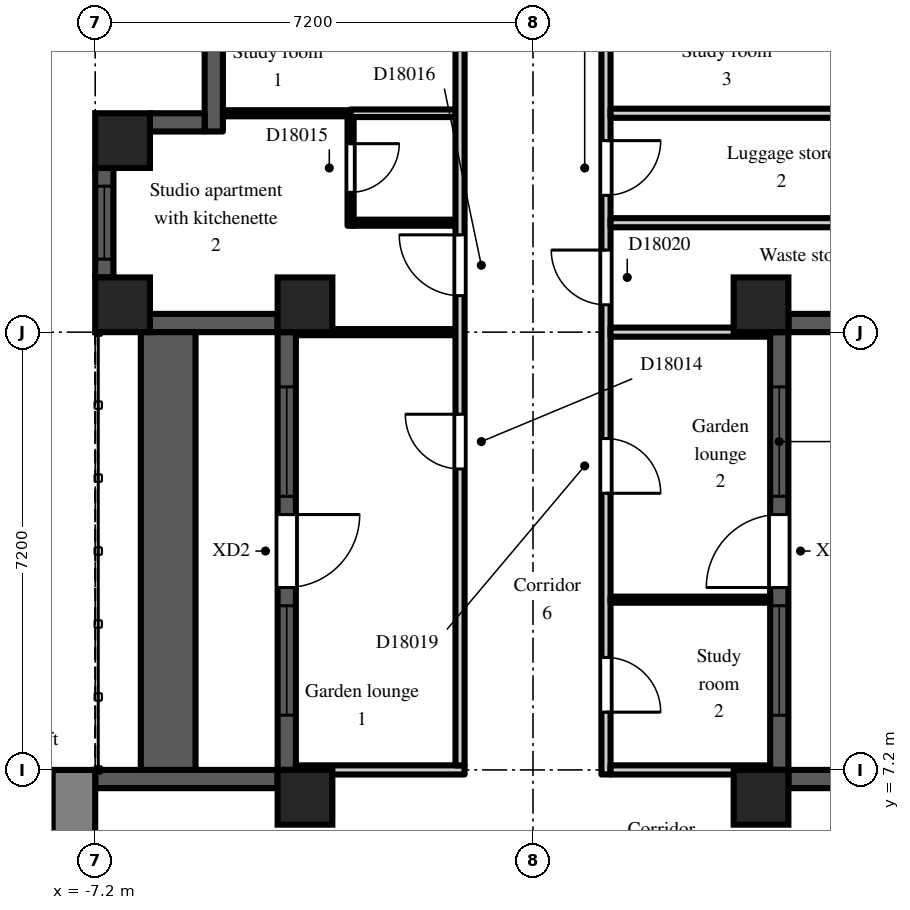
"""IFC4 building model, lengths in metres.
Left out: names, types, materials, properties, quantities, classifications, styles, units other than length and angle.
Written with IfcOpenShell. Run it as: python <this file> out.ifc"""

import sys

from ifc_helpers import new_model, si_unit, direction, frame, frame_2d, origin, origin_2d, place, context, subcontext, project, spatial, rectangle, extrude, element, fill, save


model = new_model("IFC4")
c1 = context("Model", 3, precision=1e-05, world=origin(), true_north=direction((0.0, 1.0)))
c2 = subcontext(c1, "Body", "Model", "MODEL_VIEW")
j1 = project(units=[si_unit("LENGTHUNIT", "METRE"), si_unit("PLANEANGLEUNIT", "RADIAN")], contexts=[c1])
p1 = place(None, origin())
s1 = spatial("IfcSite", under=j1, at=p1, CompositionType="ELEMENT")
p2 = place(p1, origin())
s2 = spatial("IfcBuilding", under=s1, at=p2, CompositionType="ELEMENT")
p3 = place(p2, frame((0.0, 0.0, 123.3)))
s3 = spatial("IfcBuildingStorey", under=s2, at=p3, CompositionType="ELEMENT", Elevation=123.3)
for number, where, z_axis, x_axis in (
    (1, (-6.75, 14.85, 0.0), (0.0, 0.0, 1.0), (1.0, 0.0, 0.0)),
    (2, (-6.75, 17.55, 0.0), (0.0, 0.0, 1.0), (1.0, 0.0, 0.0)),
    (3, (-3.75, 6.75, 0.0), (0.0, 0.0, 1.0), (1.0, 0.0, 0.0)),
    (4, (-3.75, 14.85, 0.0), (0.0, 0.0, 1.0), (1.0, 0.0, 0.0)),
    (5, (3.75, 6.75, 0.0), (0.0, 0.0, 1.0), (1.0, 0.0, 0.0)),
    (6, (3.75, 14.85, 0.0), (0.0, 0.0, 1.0), (1.0, 0.0, 0.0)),
):
    element("IfcColumn", number, at=place(p3, frame(where, z_axis=z_axis, x_axis=x_axis)), inside=s3, PredefinedType="COLUMN", context=c2, shape_type="SweptSolid", body=[
        extrude(rectangle(XDim=0.9, YDim=0.9, at=origin_2d()), origin(), (0.0, 0.0, 1.0), 3.0),
    ])
p4 = place(p3, frame((7.2, 7.05, 0.0), z_axis=(0.0, 0.0, 1.0), x_axis=(-1.0, 0.0, 0.0)))
e7 = element("IfcWall", 7, at=p4, inside=s3, PredefinedType="SOLIDWALL", context=c2, shape_type="SweptSolid", body=[
    extrude(rectangle(XDim=3.0, YDim=0.3, at=frame_2d((1.5, 0.0))), origin(), (0.0, 0.0, 1.0), 2.2),
])
p5 = place(p3, frame((4.05, 7.2, 0.0), z_axis=(0.0, 0.0, 1.0), x_axis=(0.0, 1.0, 0.0)))
e8 = element("IfcWall", 8, at=p5, inside=s3, PredefinedType="SOLIDWALL", context=c2, shape_type="SweptSolid", body=[
    extrude(rectangle(XDim=7.2, YDim=0.3, at=frame_2d((3.6, 0.0))), origin(), (0.0, 0.0, 1.0), 2.2),
])
p6 = place(p5, frame((3.0, 0.0, 0.0)))
e9 = element("IfcOpeningElement", 9, at=p6, cuts=e8, PredefinedType="OPENING", context=c2, shape_type="SweptSolid", body=[
    extrude(rectangle(XDim=1.2, YDim=2.05, at=frame_2d((0.6, 1.025))), frame((0.0, 0.16, 0.0), z_axis=(0.0, -1.0, 0.0), x_axis=(1.0, 0.0, 0.0)), (0.0, 0.0, 1.0), 0.32),
])
p7 = place(p5, frame((0.9, 0.0, 0.2)))
e10 = element("IfcOpeningElement", 10, at=p7, cuts=e8, PredefinedType="OPENING", context=c2, shape_type="SweptSolid", body=[
    extrude(rectangle(XDim=1.8, YDim=1.85, at=frame_2d((0.9, 0.925))), frame((0.0, 0.16, 0.0), z_axis=(0.0, -1.0, 0.0), x_axis=(1.0, 0.0, 0.0)), (0.0, 0.0, 1.0), 0.32),
])
p8 = place(p5, frame((4.5, 0.0, 0.2)))
e11 = element("IfcOpeningElement", 11, at=p8, cuts=e8, PredefinedType="OPENING", context=c2, shape_type="SweptSolid", body=[
    extrude(rectangle(XDim=1.8, YDim=1.85, at=frame_2d((0.9, 0.925))), frame((0.0, 0.16, 0.0), z_axis=(0.0, -1.0, 0.0), x_axis=(1.0, 0.0, 0.0)), (0.0, 0.0, 1.0), 0.32),
])
p9 = place(p3, frame((4.2, 14.55, 0.0), z_axis=(0.0, 0.0, 1.0), x_axis=(1.0, 0.0, 0.0)))
e12 = element("IfcWall", 12, at=p9, inside=s3, PredefinedType="SOLIDWALL", context=c2, shape_type="SweptSolid", body=[
    extrude(rectangle(XDim=2.1, YDim=0.3, at=frame_2d((1.05, 0.0))), origin(), (0.0, 0.0, 1.0), 2.2),
])
p10 = place(p3, frame((-5.25, 19.5, 0.0), z_axis=(0.0, 0.0, 1.0), x_axis=(0.0, -1.0, 0.0)))
e13 = element("IfcWall", 13, at=p10, inside=s3, PredefinedType="SOLIDWALL", context=c2, shape_type="SweptSolid", body=[
    extrude(rectangle(XDim=1.8, YDim=0.3, at=frame_2d((0.9, 0.0))), origin(), (0.0, 0.0, 1.0), 2.6),
])
p11 = place(p3, frame((-5.4, 17.85, 0.0), z_axis=(0.0, 0.0, 1.0), x_axis=(-1.0, 0.0, 0.0)))
e14 = element("IfcWall", 14, at=p11, inside=s3, PredefinedType="SOLIDWALL", context=c2, shape_type="SweptSolid", body=[
    extrude(rectangle(XDim=0.9, YDim=0.3, at=frame_2d((0.45, 0.0))), origin(), (0.0, 0.0, 1.0), 2.6),
])
p12 = place(p3, frame((-7.05, 17.1, 0.0), z_axis=(0.0, 0.0, 1.0), x_axis=(0.0, -1.0, 0.0)))
e15 = element("IfcWall", 15, at=p12, inside=s3, PredefinedType="SOLIDWALL", context=c2, shape_type="SweptSolid", body=[
    extrude(rectangle(XDim=1.8, YDim=0.3, at=frame_2d((0.9, 0.0))), origin(), (0.0, 0.0, 1.0), 2.2),
])
p13 = place(p12, frame((0.3, 0.0, 0.2)))
e16 = element("IfcOpeningElement", 16, at=p13, cuts=e15, PredefinedType="OPENING", context=c2, shape_type="SweptSolid", body=[
    extrude(rectangle(XDim=1.2, YDim=1.85, at=frame_2d((0.6, 0.925))), frame((0.0, 0.16, 0.0), z_axis=(0.0, -1.0, 0.0), x_axis=(1.0, 0.0, 0.0)), (0.0, 0.0, 1.0), 0.32),
])
p14 = place(p3, frame((-6.3, 14.55, 0.0), z_axis=(0.0, 0.0, 1.0), x_axis=(1.0, 0.0, 0.0)))
e17 = element("IfcWall", 17, at=p14, inside=s3, PredefinedType="SOLIDWALL", context=c2, shape_type="SweptSolid", body=[
    extrude(rectangle(XDim=2.1, YDim=0.3, at=frame_2d((1.05, 0.0))), origin(), (0.0, 0.0, 1.0), 2.2),
])
p15 = place(p3, frame((-4.05, 14.4, 0.0), z_axis=(0.0, 0.0, 1.0), x_axis=(0.0, -1.0, 0.0)))
e18 = element("IfcWall", 18, at=p15, inside=s3, PredefinedType="SOLIDWALL", context=c2, shape_type="SweptSolid", body=[
    extrude(rectangle(XDim=7.2, YDim=0.3, at=frame_2d((3.6, 0.0))), origin(), (0.0, 0.0, 1.0), 2.2),
])
p16 = place(p15, frame((3.0, 0.0, 0.0)))
e19 = element("IfcOpeningElement", 19, at=p16, cuts=e18, PredefinedType="OPENING", context=c2, shape_type="SweptSolid", body=[
    extrude(rectangle(XDim=1.2, YDim=2.05, at=frame_2d((0.6, 1.025))), frame((0.0, 0.16, 0.0), z_axis=(0.0, -1.0, 0.0), x_axis=(1.0, 0.0, 0.0)), (0.0, 0.0, 1.0), 0.32),
])
p17 = place(p15, frame((0.9, 0.0, 0.2)))
e20 = element("IfcOpeningElement", 20, at=p17, cuts=e18, PredefinedType="OPENING", context=c2, shape_type="SweptSolid", body=[
    extrude(rectangle(XDim=1.8, YDim=1.85, at=frame_2d((0.9, 0.925))), frame((0.0, 0.16, 0.0), z_axis=(0.0, -1.0, 0.0), x_axis=(1.0, 0.0, 0.0)), (0.0, 0.0, 1.0), 0.32),
])
p18 = place(p15, frame((4.5, 0.0, 0.2)))
e21 = element("IfcOpeningElement", 21, at=p18, cuts=e18, PredefinedType="OPENING", context=c2, shape_type="SweptSolid", body=[
    extrude(rectangle(XDim=1.8, YDim=1.85, at=frame_2d((0.9, 0.925))), frame((0.0, 0.16, 0.0), z_axis=(0.0, -1.0, 0.0), x_axis=(1.0, 0.0, 0.0)), (0.0, 0.0, 1.0), 0.32),
])
p19 = place(p3, frame((-4.2, 7.05, 0.0), z_axis=(0.0, 0.0, 1.0), x_axis=(-1.0, 0.0, 0.0)))
e22 = element("IfcWall", 22, at=p19, inside=s3, PredefinedType="SOLIDWALL", context=c2, shape_type="SweptSolid", body=[
    extrude(rectangle(XDim=3.0, YDim=0.3, at=frame_2d((1.5, 0.0))), origin(), (0.0, 0.0, 1.0), 2.2),
])
p20 = place(p3, frame((-6.0, 7.2, 0.0), z_axis=(0.0, 0.0, 1.0), x_axis=(0.0, 1.0, 0.0)))
e23 = element("IfcWall", 23, at=p20, inside=s3, PredefinedType="PARAPET", context=c2, shape_type="SweptSolid", body=[
    extrude(rectangle(XDim=7.2, YDim=0.9, at=frame_2d((3.6, 0.0))), origin(), (0.0, 0.0, 1.0), 0.8),
])
p21 = place(p3, frame((-7.55, -7.2, 0.0), z_axis=(0.0, 0.0, 1.0), x_axis=(0.0, 1.0, 0.0)))
e24 = element("IfcWall", 24, at=p21, inside=s3, PredefinedType="SHEAR", context=c2, shape_type="SweptSolid", body=[
    extrude(rectangle(XDim=14.4, YDim=0.7, at=frame_2d((7.2, 0.0))), origin(), (0.0, 0.0, 1.0), 2.6),
])
p22 = place(p21, frame((6.0, 0.0, 0.0)))
e25 = element("IfcOpeningElement", 25, at=p22, cuts=e24, PredefinedType="OPENING", context=c2, shape_type="SweptSolid", body=[
    extrude(rectangle(XDim=2.4, YDim=2.2, at=frame_2d((1.2, 1.1))), frame((0.0, 0.36, 0.0), z_axis=(0.0, -1.0, 0.0), x_axis=(1.0, 0.0, 0.0)), (0.0, 0.0, 1.0), 0.72),
])
p23 = place(p3, frame((-5.1, 18.0, 0.0), z_axis=(0.0, 0.0, 1.0), x_axis=(1.0, 0.0, 0.0)))
e26 = element("IfcWall", 26, at=p23, inside=s3, PredefinedType="PARTITIONING", context=c2, shape_type="SweptSolid", body=[
    extrude(rectangle(XDim=2.1, YDim=0.1, at=frame_2d((1.05, 0.0))), origin(), (0.0, 0.0, 1.0), 2.6),
])
p24 = place(p3, frame((-3.9, 7.2, 0.0), z_axis=(0.0, 0.0, 1.0), x_axis=(1.0, 0.0, 0.0)))
e27 = element("IfcWall", 27, at=p24, inside=s3, PredefinedType="PARTITIONING", context=c2, shape_type="SweptSolid", body=[
    extrude(rectangle(XDim=2.775, YDim=0.15, at=frame_2d((1.387, 0.0))), origin(), (0.0, 0.0, 1.0), 2.6),
])
p25 = place(p3, frame((-3.9, 14.4, 0.0), z_axis=(0.0, 0.0, 1.0), x_axis=(1.0, 0.0, 0.0)))
e28 = element("IfcWall", 28, at=p25, inside=s3, PredefinedType="PARTITIONING", context=c2, shape_type="SweptSolid", body=[
    extrude(rectangle(XDim=2.625, YDim=0.1, at=frame_2d((1.312, 0.0))), origin(), (0.0, 0.0, 1.0), 2.6),
])
p26 = place(p3, frame((-3.0, 16.15, 0.0), z_axis=(0.0, 0.0, 1.0), x_axis=(0.0, 1.0, 0.0)))
e29 = element("IfcWall", 29, at=p26, inside=s3, PredefinedType="PARTITIONING", context=c2, shape_type="SweptSolid", body=[
    extrude(rectangle(XDim=1.788, YDim=0.1, at=frame_2d((0.894, 0.0))), origin(), (0.0, 0.0, 1.0), 2.6),
])
p27 = place(p26, frame((0.55, 0.0, 0.0)))
e30 = element("IfcOpeningElement", 30, at=p27, cuts=e29, PredefinedType="OPENING", context=c2, shape_type="SweptSolid", body=[
    extrude(rectangle(XDim=0.8, YDim=2.1, at=frame_2d((0.4, 1.05))), frame((0.0, 0.06, 0.0), z_axis=(0.0, -1.0, 0.0), x_axis=(1.0, 0.0, 0.0)), (0.0, 0.0, 1.0), 0.12),
])
p28 = place(p3, frame((-2.95, 16.2, 0.0), z_axis=(0.0, 0.0, 1.0), x_axis=(1.0, 0.0, 0.0)))
e31 = element("IfcWall", 31, at=p28, inside=s3, PredefinedType="PARTITIONING", context=c2, shape_type="SweptSolid", body=[
    extrude(rectangle(XDim=1.675, YDim=0.1, at=frame_2d((0.837, 0.0))), origin(), (0.0, 0.0, 1.0), 2.6),
])
p29 = place(p3, frame((-3.0, 18.0, 0.0), z_axis=(0.0, 0.0, 1.0), x_axis=(1.0, 0.0, 0.0)))
e32 = element("IfcWall", 32, at=p29, inside=s3, PredefinedType="PARTITIONING", context=c2, shape_type="SweptSolid", body=[
    extrude(rectangle(XDim=1.725, YDim=0.125, at=frame_2d((0.863, 0.0))), origin(), (0.0, 0.0, 1.0), 2.6),
])
p30 = place(p3, frame((-1.2, 7.275, 0.0), z_axis=(0.0, 0.0, 1.0), x_axis=(0.0, 1.0, 0.0)))
e33 = element("IfcWall", 33, at=p30, inside=s3, PredefinedType="PARTITIONING", context=c2, shape_type="SweptSolid", body=[
    extrude(rectangle(XDim=14.025, YDim=0.15, at=frame_2d((7.013, 0.0))), origin(), (0.0, 0.0, 1.0), 2.6),
])
p31 = place(p30, frame((4.875, 0.0, 0.0)))
e34 = element("IfcOpeningElement", 34, at=p31, cuts=e33, PredefinedType="OPENING", context=c2, shape_type="SweptSolid", body=[
    extrude(rectangle(XDim=0.9, YDim=2.1, at=frame_2d((0.45, 1.05))), frame((0.0, 0.085, 0.0), z_axis=(0.0, -1.0, 0.0), x_axis=(1.0, 0.0, 0.0)), (0.0, 0.0, 1.0), 0.17),
])
p32 = place(p30, frame((7.725, 0.0, 0.0)))
e35 = element("IfcOpeningElement", 35, at=p32, cuts=e33, PredefinedType="OPENING", context=c2, shape_type="SweptSolid", body=[
    extrude(rectangle(XDim=1.0, YDim=2.1, at=frame_2d((0.5, 1.05))), frame((0.0, 0.085, 0.0), z_axis=(0.0, -1.0, 0.0), x_axis=(1.0, 0.0, 0.0)), (0.0, 0.0, 1.0), 0.17),
])
p33 = place(p30, frame((11.925, 0.0, 0.0)))
e36 = element("IfcOpeningElement", 36, at=p33, cuts=e33, PredefinedType="OPENING", context=c2, shape_type="SweptSolid", body=[
    extrude(rectangle(XDim=0.9, YDim=2.1, at=frame_2d((0.45, 1.05))), frame((0.0, 0.085, 0.0), z_axis=(0.0, -1.0, 0.0), x_axis=(1.0, 0.0, 0.0)), (0.0, 0.0, 1.0), 0.17),
])
p34 = place(p3, frame((1.2, 7.125, 0.0), z_axis=(0.0, 0.0, 1.0), x_axis=(0.0, 1.0, 0.0)))
e37 = element("IfcWall", 37, at=p34, inside=s3, PredefinedType="PARTITIONING", context=c2, shape_type="SweptSolid", body=[
    extrude(rectangle(XDim=14.175, YDim=0.15, at=frame_2d((7.087, 0.0))), origin(), (0.0, 0.0, 1.0), 2.6),
])
p35 = place(p34, frame((1.025, 0.0, 0.0)))
e38 = element("IfcOpeningElement", 38, at=p35, cuts=e37, PredefinedType="OPENING", context=c2, shape_type="SweptSolid", body=[
    extrude(rectangle(XDim=0.9, YDim=2.1, at=frame_2d((0.45, 1.05))), frame((0.0, 0.085, 0.0), z_axis=(0.0, -1.0, 0.0), x_axis=(1.0, 0.0, 0.0)), (0.0, 0.0, 1.0), 0.17),
])
p36 = place(p34, frame((4.625, 0.0, 0.0)))
e39 = element("IfcOpeningElement", 39, at=p36, cuts=e37, PredefinedType="OPENING", context=c2, shape_type="SweptSolid", body=[
    extrude(rectangle(XDim=0.9, YDim=2.1, at=frame_2d((0.45, 1.05))), frame((0.0, 0.085, 0.0), z_axis=(0.0, -1.0, 0.0), x_axis=(1.0, 0.0, 0.0)), (0.0, 0.0, 1.0), 0.17),
])
p37 = place(p34, frame((7.725, 0.0, 0.0)))
e40 = element("IfcOpeningElement", 40, at=p37, cuts=e37, PredefinedType="OPENING", context=c2, shape_type="SweptSolid", body=[
    extrude(rectangle(XDim=0.9, YDim=2.1, at=frame_2d((0.45, 1.05))), frame((0.0, 0.085, 0.0), z_axis=(0.0, -1.0, 0.0), x_axis=(1.0, 0.0, 0.0)), (0.0, 0.0, 1.0), 0.17),
])
p38 = place(p34, frame((9.525, 0.0, 0.0)))
e41 = element("IfcOpeningElement", 41, at=p38, cuts=e37, PredefinedType="OPENING", context=c2, shape_type="SweptSolid", body=[
    extrude(rectangle(XDim=0.9, YDim=2.1, at=frame_2d((0.45, 1.05))), frame((0.0, 0.085, 0.0), z_axis=(0.0, -1.0, 0.0), x_axis=(1.0, 0.0, 0.0)), (0.0, 0.0, 1.0), 0.17),
])
p39 = place(p34, frame((12.075, 0.0, 0.0)))
e42 = element("IfcOpeningElement", 42, at=p39, cuts=e37, PredefinedType="OPENING", context=c2, shape_type="SweptSolid", body=[
    extrude(rectangle(XDim=0.9, YDim=2.1, at=frame_2d((0.45, 1.05))), frame((0.0, 0.085, 0.0), z_axis=(0.0, -1.0, 0.0), x_axis=(1.0, 0.0, 0.0)), (0.0, 0.0, 1.0), 0.17),
])
p40 = place(p3, frame((1.275, 7.2, 0.0), z_axis=(0.0, 0.0, 1.0), x_axis=(1.0, 0.0, 0.0)))
e43 = element("IfcWall", 43, at=p40, inside=s3, PredefinedType="PARTITIONING", context=c2, shape_type="SweptSolid", body=[
    extrude(rectangle(XDim=2.625, YDim=0.15, at=frame_2d((1.312, 0.0))), origin(), (0.0, 0.0, 1.0), 2.6),
])
p41 = place(p3, frame((1.275, 10.0, 0.0), z_axis=(0.0, 0.0, 1.0), x_axis=(1.0, 0.0, 0.0)))
e44 = element("IfcWall", 44, at=p41, inside=s3, PredefinedType="PARTITIONING", context=c2, shape_type="SweptSolid", body=[
    extrude(rectangle(XDim=2.625, YDim=0.1, at=frame_2d((1.312, 0.0))), origin(), (0.0, 0.0, 1.0), 2.6),
])
p42 = place(p3, frame((1.275, 14.4, 0.0), z_axis=(0.0, 0.0, 1.0), x_axis=(1.0, 0.0, 0.0)))
e45 = element("IfcWall", 45, at=p42, inside=s3, PredefinedType="PARTITIONING", context=c2, shape_type="SweptSolid", body=[
    extrude(rectangle(XDim=2.625, YDim=0.15, at=frame_2d((1.312, 0.0))), origin(), (0.0, 0.0, 1.0), 2.6),
])
p43 = place(p3, frame((1.275, 16.2, 0.0), z_axis=(0.0, 0.0, 1.0), x_axis=(1.0, 0.0, 0.0)))
e46 = element("IfcWall", 46, at=p43, inside=s3, PredefinedType="PARTITIONING", context=c2, shape_type="SweptSolid", body=[
    extrude(rectangle(XDim=5.625, YDim=0.15, at=frame_2d((2.812, 0.0))), origin(), (0.0, 0.0, 1.0), 2.6),
])
p44 = place(p3, frame((1.275, 18.0, 0.0), z_axis=(0.0, 0.0, 1.0), x_axis=(1.0, 0.0, 0.0)))
e47 = element("IfcWall", 47, at=p44, inside=s3, PredefinedType="PARTITIONING", context=c2, shape_type="SweptSolid", body=[
    extrude(rectangle(XDim=3.825, YDim=0.15, at=frame_2d((1.913, 0.0))), origin(), (0.0, 0.0, 1.0), 2.6),
])
p45 = place(p6, origin())
e48 = element("IfcDoor", 48, at=p45, inside=s3, OperationType="SINGLE_SWING_LEFT", PredefinedType="DOOR", context=c2, shape_type="SweptSolid", body=[
    extrude(rectangle(XDim=1.2, YDim=2.05, at=frame_2d((0.6, 1.025))), frame((0.0, 0.025, 0.0), z_axis=(0.0, -1.0, 0.0), x_axis=(1.0, 0.0, 0.0)), (0.0, 0.0, 1.0), 0.05),
])
fill(e9, e48)
p46 = place(p7, origin())
e49 = element("IfcWindow", 49, at=p46, inside=s3, PartitioningType="SINGLE_PANEL", PredefinedType="WINDOW", context=c2, shape_type="SweptSolid", body=[
    extrude(rectangle(XDim=1.8, YDim=1.85, at=frame_2d((0.9, 0.925))), frame((0.0, 0.03, 0.0), z_axis=(0.0, -1.0, 0.0), x_axis=(1.0, 0.0, 0.0)), (0.0, 0.0, 1.0), 0.06),
])
fill(e10, e49)
p47 = place(p8, origin())
e50 = element("IfcWindow", 50, at=p47, inside=s3, PartitioningType="SINGLE_PANEL", PredefinedType="WINDOW", context=c2, shape_type="SweptSolid", body=[
    extrude(rectangle(XDim=1.8, YDim=1.85, at=frame_2d((0.9, 0.925))), frame((0.0, 0.03, 0.0), z_axis=(0.0, -1.0, 0.0), x_axis=(1.0, 0.0, 0.0)), (0.0, 0.0, 1.0), 0.06),
])
fill(e11, e50)
p48 = place(p13, origin())
e51 = element("IfcWindow", 51, at=p48, inside=s3, PartitioningType="SINGLE_PANEL", PredefinedType="WINDOW", context=c2, shape_type="SweptSolid", body=[
    extrude(rectangle(XDim=1.2, YDim=1.85, at=frame_2d((0.6, 0.925))), frame((0.0, 0.03, 0.0), z_axis=(0.0, -1.0, 0.0), x_axis=(1.0, 0.0, 0.0)), (0.0, 0.0, 1.0), 0.06),
])
fill(e16, e51)
p49 = place(p16, origin())
e52 = element("IfcDoor", 52, at=p49, inside=s3, OperationType="SINGLE_SWING_LEFT", PredefinedType="DOOR", context=c2, shape_type="SweptSolid", body=[
    extrude(rectangle(XDim=1.2, YDim=2.05, at=frame_2d((0.6, 1.025))), frame((0.0, 0.025, 0.0), z_axis=(0.0, -1.0, 0.0), x_axis=(1.0, 0.0, 0.0)), (0.0, 0.0, 1.0), 0.05),
])
fill(e19, e52)
p50 = place(p17, origin())
e53 = element("IfcWindow", 53, at=p50, inside=s3, PartitioningType="SINGLE_PANEL", PredefinedType="WINDOW", context=c2, shape_type="SweptSolid", body=[
    extrude(rectangle(XDim=1.8, YDim=1.85, at=frame_2d((0.9, 0.925))), frame((0.0, 0.03, 0.0), z_axis=(0.0, -1.0, 0.0), x_axis=(1.0, 0.0, 0.0)), (0.0, 0.0, 1.0), 0.06),
])
fill(e20, e53)
p51 = place(p18, origin())
e54 = element("IfcWindow", 54, at=p51, inside=s3, PartitioningType="SINGLE_PANEL", PredefinedType="WINDOW", context=c2, shape_type="SweptSolid", body=[
    extrude(rectangle(XDim=1.8, YDim=1.85, at=frame_2d((0.9, 0.925))), frame((0.0, 0.03, 0.0), z_axis=(0.0, -1.0, 0.0), x_axis=(1.0, 0.0, 0.0)), (0.0, 0.0, 1.0), 0.06),
])
fill(e21, e54)
p52 = place(p31, origin())
e55 = element("IfcDoor", 55, at=p52, inside=s3, OperationType="SINGLE_SWING_RIGHT", PredefinedType="DOOR", context=c2, shape_type="SweptSolid", body=[
    extrude(rectangle(XDim=0.9, YDim=2.1, at=frame_2d((0.45, 1.05))), frame((0.0, 0.025, 0.0), z_axis=(0.0, -1.0, 0.0), x_axis=(1.0, 0.0, 0.0)), (0.0, 0.0, 1.0), 0.05),
])
fill(e34, e55)
p53 = place(p27, frame((0.8, 0.0, 0.0), z_axis=(0.0, 0.0, 1.0), x_axis=(-1.0, 0.0, 0.0)))
e56 = element("IfcDoor", 56, at=p53, inside=s3, OperationType="SINGLE_SWING_LEFT", PredefinedType="DOOR", context=c2, shape_type="SweptSolid", body=[
    extrude(rectangle(XDim=0.8, YDim=2.1, at=frame_2d((0.4, 1.05))), frame((0.0, 0.025, 0.0), z_axis=(0.0, -1.0, 0.0), x_axis=(1.0, 0.0, 0.0)), (0.0, 0.0, 1.0), 0.05),
])
fill(e30, e56)
p54 = place(p32, origin())
e57 = element("IfcDoor", 57, at=p54, inside=s3, OperationType="SINGLE_SWING_RIGHT", PredefinedType="DOOR", context=c2, shape_type="SweptSolid", body=[
    extrude(rectangle(XDim=1.0, YDim=2.1, at=frame_2d((0.5, 1.05))), frame((0.0, 0.025, 0.0), z_axis=(0.0, -1.0, 0.0), x_axis=(1.0, 0.0, 0.0)), (0.0, 0.0, 1.0), 0.05),
])
fill(e35, e57)
p55 = place(p35, frame((0.9, 0.0, 0.0), z_axis=(0.0, 0.0, 1.0), x_axis=(-1.0, 0.0, 0.0)))
e58 = element("IfcDoor", 58, at=p55, inside=s3, OperationType="SINGLE_SWING_RIGHT", PredefinedType="DOOR", context=c2, shape_type="SweptSolid", body=[
    extrude(rectangle(XDim=0.9, YDim=2.1, at=frame_2d((0.45, 1.05))), frame((0.0, 0.025, 0.0), z_axis=(0.0, -1.0, 0.0), x_axis=(1.0, 0.0, 0.0)), (0.0, 0.0, 1.0), 0.05),
])
fill(e38, e58)
p56 = place(p36, frame((0.9, 0.0, 0.0), z_axis=(0.0, 0.0, 1.0), x_axis=(-1.0, 0.0, 0.0)))
e59 = element("IfcDoor", 59, at=p56, inside=s3, OperationType="SINGLE_SWING_RIGHT", PredefinedType="DOOR", context=c2, shape_type="SweptSolid", body=[
    extrude(rectangle(XDim=0.9, YDim=2.1, at=frame_2d((0.45, 1.05))), frame((0.0, 0.025, 0.0), z_axis=(0.0, -1.0, 0.0), x_axis=(1.0, 0.0, 0.0)), (0.0, 0.0, 1.0), 0.05),
])
fill(e39, e59)
p57 = place(p37, origin())
e60 = element("IfcDoor", 60, at=p57, inside=s3, OperationType="SINGLE_SWING_RIGHT", PredefinedType="DOOR", context=c2, shape_type="SweptSolid", body=[
    extrude(rectangle(XDim=0.9, YDim=2.1, at=frame_2d((0.45, 1.05))), frame((0.0, 0.025, 0.0), z_axis=(0.0, -1.0, 0.0), x_axis=(1.0, 0.0, 0.0)), (0.0, 0.0, 1.0), 0.05),
])
fill(e40, e60)
p58 = place(p38, frame((0.9, 0.0, 0.0), z_axis=(0.0, 0.0, 1.0), x_axis=(-1.0, 0.0, 0.0)))
e61 = element("IfcDoor", 61, at=p58, inside=s3, OperationType="SINGLE_SWING_LEFT", PredefinedType="DOOR", context=c2, shape_type="SweptSolid", body=[
    extrude(rectangle(XDim=0.9, YDim=2.1, at=frame_2d((0.45, 1.05))), frame((0.0, 0.025, 0.0), z_axis=(0.0, -1.0, 0.0), x_axis=(1.0, 0.0, 0.0)), (0.0, 0.0, 1.0), 0.05),
])
fill(e41, e61)
save(model, sys.argv[1])
